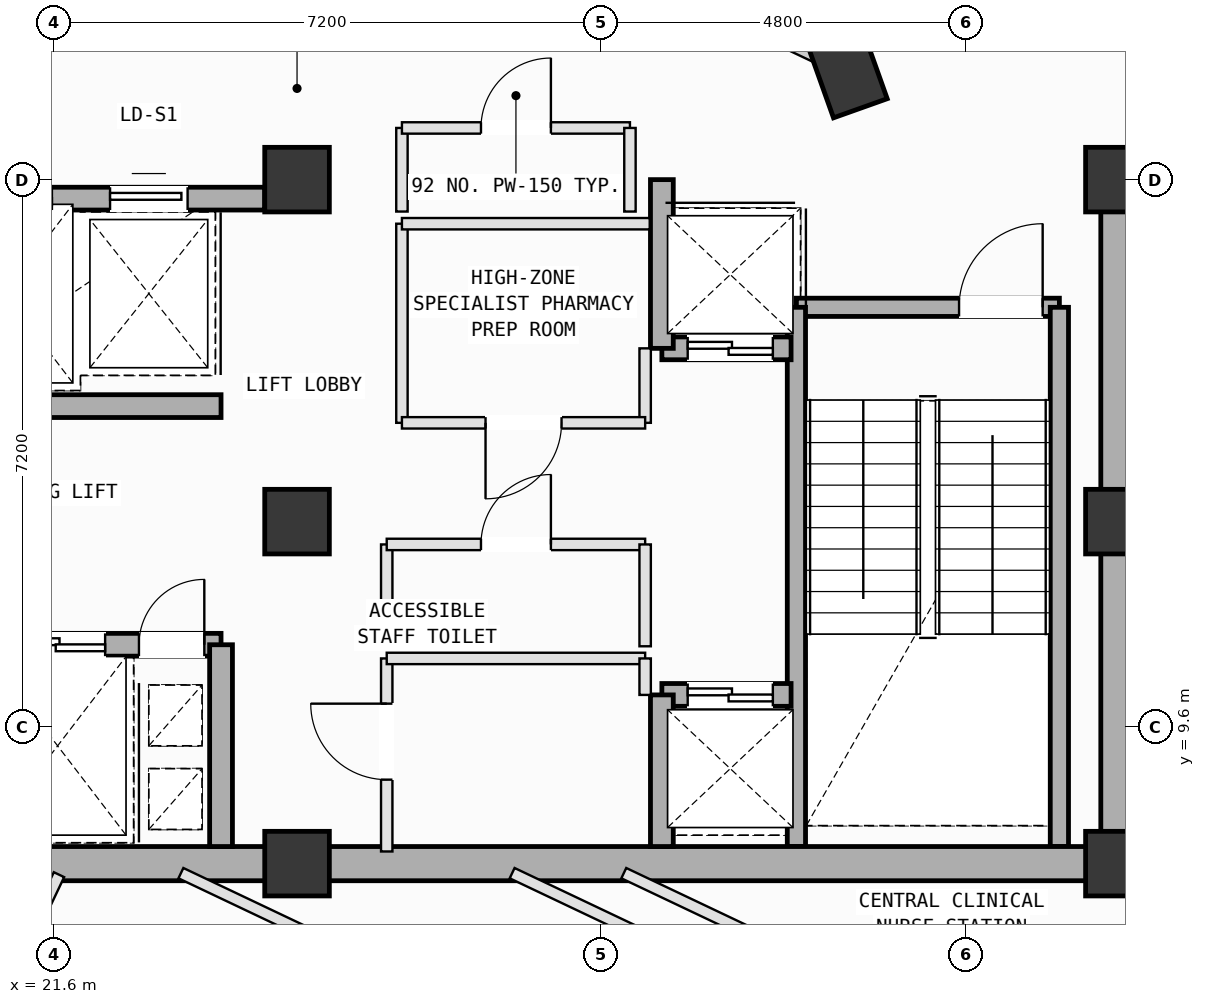
"""IFC4 building model, lengths in metres.
Left out: names, types, materials, properties, quantities, classifications, styles, units other than length and angle.
Written with IfcOpenShell. Run it as: python <this file> out.ifc"""

import sys

from ifc_helpers import new_model, si_unit, direction, frame, frame_2d, origin, origin_2d, place, context, subcontext, project, spatial, rectangle, extrude, element, fill, save


model = new_model("IFC4")
c1 = context("Model", 3, precision=1e-05, world=origin(), true_north=direction((0.0, 1.0)))
c2 = subcontext(c1, "Body", "Model", "MODEL_VIEW")
j1 = project(units=[si_unit("LENGTHUNIT", "METRE"), si_unit("PLANEANGLEUNIT", "RADIAN")], contexts=[c1])
p1 = place(None, origin())
s1 = spatial("IfcSite", under=j1, at=p1, CompositionType="ELEMENT")
p2 = place(p1, origin())
s2 = spatial("IfcBuilding", under=s1, at=p2, CompositionType="ELEMENT")
p3 = place(p2, frame((0.0, 0.0, 300.6)))
s3 = spatial("IfcBuildingStorey", under=s2, at=p3, CompositionType="ELEMENT", Elevation=300.6)
for number, where, z_axis, x_axis in (
    (1, (24.8, 7.8, 0.0), (0.0, 0.0, 1.0), (1.0, 0.0, 0.0)),
    (2, (24.8, 12.3, 0.0), (0.0, 0.0, 1.0), (1.0, 0.0, 0.0)),
    (3, (24.8, 16.8, 0.0), (0.0, 0.0, 1.0), (1.0, 0.0, 0.0)),
    (4, (35.6, 7.8, 0.0), (0.0, 0.0, 1.0), (1.0, 0.0, 0.0)),
    (5, (35.6, 12.3, 0.0), (0.0, 0.0, 1.0), (1.0, 0.0, 0.0)),
    (6, (35.6, 16.8, 0.0), (0.0, 0.0, 1.0), (1.0, 0.0, 0.0)),
):
    element("IfcColumn", number, at=place(p3, frame(where, z_axis=z_axis, x_axis=x_axis)), inside=s3, PredefinedType="COLUMN", context=c2, shape_type="SweptSolid", body=[
        extrude(rectangle(XDim=0.85, YDim=0.85, at=origin_2d()), origin(), (0.0, 0.0, 1.0), 4.0),
    ])
p4 = place(p3, frame((32.01, 18.304, 0.002), z_axis=(0.026991866876, -0.006412095072, 0.999615088001), x_axis=(-0.993728764911, -0.108720172199, 0.026135530332)))
e7 = element("IfcColumn", 7, at=p4, inside=s3, PredefinedType="COLUMN", context=c2, shape_type="SweptSolid", body=[
    extrude(rectangle(XDim=1.2, YDim=0.75, at=origin_2d()), origin(), (0.0, 0.0, 1.0), 3.998),
])
p5 = place(p3, frame((25.415, 21.436, 0.0), z_axis=(0.0, 0.0, 1.0), x_axis=(0.903343787047, -0.428917244236, 0.0)))
e8 = element("IfcWall", 8, at=p5, inside=s3, PredefinedType="SOLIDWALL", context=c2, shape_type="SweptSolid", body=[
    extrude(rectangle(XDim=6.958, YDim=0.28, at=frame_2d((3.479, 0.0))), origin(), (0.0, 0.0, 1.0), 3.165),
])
p6 = place(p3, frame((31.37, 15.12, 0.0), z_axis=(0.0, 0.0, 1.0), x_axis=(1.0, 0.0, 0.0)))
e9 = element("IfcWall", 9, at=p6, inside=s3, PredefinedType="SOLIDWALL", context=c2, shape_type="SweptSolid", body=[
    extrude(rectangle(XDim=3.46, YDim=0.24, at=frame_2d((1.73, 0.0))), origin(), (0.0, 0.0, 1.0), 3.78),
])
p7 = place(p6, frame((2.14, 0.0, 0.0)))
e10 = element("IfcOpeningElement", 10, at=p7, cuts=e9, PredefinedType="OPENING", context=c2, shape_type="SweptSolid", body=[
    extrude(rectangle(XDim=1.1, YDim=2.15, at=frame_2d((0.55, 1.075))), frame((0.0, 0.13, 0.0), z_axis=(0.0, -1.0, 0.0), x_axis=(1.0, 0.0, 0.0)), (0.0, 0.0, 1.0), 0.26),
])
for number, where, z_axis, x_axis in (
    (11, (34.83, 15.12, 0.0), (0.0, 0.0, 1.0), (0.0, -1.0, 0.0)),
    (12, (31.37, 8.025, 0.0), (0.0, 0.0, 1.0), (0.0, 1.0, 0.0)),
):
    element("IfcWall", number, at=place(p3, frame(where, z_axis=z_axis, x_axis=x_axis)), inside=s3, PredefinedType="SOLIDWALL", context=c2, shape_type="SweptSolid", body=[
        extrude(rectangle(XDim=7.095, YDim=0.24, at=frame_2d((3.548, 0.0))), origin(), (0.0, 0.0, 1.0), 3.78),
    ])
for number, where, z_axis, x_axis in (
    (13, (14.0, 7.8, 0.0), (0.0, 0.0, 1.0), (1.0, 0.0, 0.0)),
    (14, (24.8, 7.8, 0.0), (0.0, 0.0, 1.0), (1.0, 0.0, 0.0)),
):
    element("IfcWall", number, at=place(p3, frame(where, z_axis=z_axis, x_axis=x_axis)), inside=s3, PredefinedType="SHEAR", context=c2, shape_type="SweptSolid", body=[
        extrude(rectangle(XDim=10.8, YDim=0.45, at=frame_2d((5.4, 0.0))), origin(), (0.0, 0.0, 1.0), 3.78),
    ])
p8 = place(p3, frame((35.6, 7.8, 0.0), z_axis=(0.0, 0.0, 1.0), x_axis=(0.0, 1.0, 0.0)))
e15 = element("IfcWall", 15, at=p8, inside=s3, PredefinedType="SHEAR", context=c2, shape_type="SweptSolid", body=[
    extrude(rectangle(XDim=9.0, YDim=0.45, at=frame_2d((4.5, 0.0))), origin(), (0.0, 0.0, 1.0), 3.78),
])
p9 = place(p3, frame((19.85, 16.55, 0.0), z_axis=(0.0, 0.0, 1.0), x_axis=(1.0, 0.0, 0.0)))
e16 = element("IfcWall", 16, at=p9, inside=s3, PredefinedType="SOLIDWALL", context=c2, shape_type="SweptSolid", body=[
    extrude(rectangle(XDim=4.525, YDim=0.3, at=frame_2d((2.262, 0.0))), origin(), (0.0, 0.0, 1.0), 3.78),
])
p10 = place(p9, frame((0.475, 0.0, 0.0)))
e17 = element("IfcOpeningElement", 17, at=p10, cuts=e16, PredefinedType="OPENING", context=c2, shape_type="SweptSolid", body=[
    extrude(rectangle(XDim=1.25, YDim=2.18, at=frame_2d((0.625, 1.09))), frame((0.0, 0.16, 0.0), z_axis=(0.0, -1.0, 0.0), x_axis=(1.0, 0.0, 0.0)), (0.0, 0.0, 1.0), 0.32),
])
p11 = place(p9, frame((2.49, 0.0, 0.0)))
e18 = element("IfcOpeningElement", 18, at=p11, cuts=e16, PredefinedType="OPENING", context=c2, shape_type="SweptSolid", body=[
    extrude(rectangle(XDim=1.02, YDim=2.12, at=frame_2d((0.51, 1.06))), frame((0.0, 0.16, 0.0), z_axis=(0.0, -1.0, 0.0), x_axis=(1.0, 0.0, 0.0)), (0.0, 0.0, 1.0), 0.32),
])
p12 = place(p3, frame((18.5, 10.68, 0.0), z_axis=(0.0, 0.0, 1.0), x_axis=(1.0, 0.0, 0.0)))
e19 = element("IfcWall", 19, at=p12, inside=s3, PredefinedType="SOLIDWALL", context=c2, shape_type="SweptSolid", body=[
    extrude(rectangle(XDim=5.3, YDim=0.3, at=frame_2d((2.65, 0.0))), origin(), (0.0, 0.0, 1.0), 3.78),
])
p13 = place(p12, frame((4.22, 0.0, 0.0)))
e20 = element("IfcOpeningElement", 20, at=p13, cuts=e19, PredefinedType="OPENING", context=c2, shape_type="SweptSolid", body=[
    extrude(rectangle(XDim=0.86, YDim=2.06, at=frame_2d((0.43, 1.03))), frame((0.0, 0.16, 0.0), z_axis=(0.0, -1.0, 0.0), x_axis=(1.0, 0.0, 0.0)), (0.0, 0.0, 1.0), 0.32),
])
p14 = place(p12, frame((0.425, 0.0, 0.0)))
e21 = element("IfcOpeningElement", 21, at=p14, cuts=e19, PredefinedType="OPENING", context=c2, shape_type="SweptSolid", body=[
    extrude(rectangle(XDim=1.25, YDim=2.18, at=frame_2d((0.625, 1.09))), frame((0.0, 0.16, 0.0), z_axis=(0.0, -1.0, 0.0), x_axis=(1.0, 0.0, 0.0)), (0.0, 0.0, 1.0), 0.32),
])
p15 = place(p12, frame((2.525, 0.0, 0.0)))
e22 = element("IfcOpeningElement", 22, at=p15, cuts=e19, PredefinedType="OPENING", context=c2, shape_type="SweptSolid", body=[
    extrude(rectangle(XDim=1.25, YDim=2.18, at=frame_2d((0.625, 1.09))), frame((0.0, 0.16, 0.0), z_axis=(0.0, -1.0, 0.0), x_axis=(1.0, 0.0, 0.0)), (0.0, 0.0, 1.0), 0.32),
])
p16 = place(p3, frame((18.5, 13.82, 0.0), z_axis=(0.0, 0.0, 1.0), x_axis=(1.0, 0.0, 0.0)))
e23 = element("IfcWall", 23, at=p16, inside=s3, PredefinedType="SOLIDWALL", context=c2, shape_type="SweptSolid", body=[
    extrude(rectangle(XDim=5.3, YDim=0.3, at=frame_2d((2.65, 0.0))), origin(), (0.0, 0.0, 1.0), 3.78),
])
p17 = place(p16, frame((0.18, 0.0, 0.0)))
e24 = element("IfcOpeningElement", 24, at=p17, cuts=e23, PredefinedType="OPENING", context=c2, shape_type="SweptSolid", body=[
    extrude(rectangle(XDim=1.1, YDim=2.15, at=frame_2d((0.55, 1.075))), frame((0.0, 0.16, 0.0), z_axis=(0.0, -1.0, 0.0), x_axis=(1.0, 0.0, 0.0)), (0.0, 0.0, 1.0), 0.32),
])
p18 = place(p3, frame((23.8, 8.025, 0.0), z_axis=(0.0, 0.0, 1.0), x_axis=(0.0, 1.0, 0.0)))
e25 = element("IfcWall", 25, at=p18, inside=s3, PredefinedType="SOLIDWALL", context=c2, shape_type="SweptSolid", body=[
    extrude(rectangle(XDim=2.655, YDim=0.3, at=frame_2d((1.328, 0.0))), origin(), (0.0, 0.0, 1.0), 3.78),
])
p19 = place(p3, frame((29.6, 10.02, 0.0), z_axis=(0.0, 0.0, 1.0), x_axis=(1.0, 0.0, 0.0)))
e26 = element("IfcWall", 26, at=p19, inside=s3, PredefinedType="SOLIDWALL", context=c2, shape_type="SweptSolid", body=[
    extrude(rectangle(XDim=1.7, YDim=0.3, at=frame_2d((0.85, 0.0))), origin(), (0.0, 0.0, 1.0), 3.78),
])
p20 = place(p19, frame((0.34, 0.0, 0.0)))
e27 = element("IfcOpeningElement", 27, at=p20, cuts=e26, PredefinedType="OPENING", context=c2, shape_type="SweptSolid", body=[
    extrude(rectangle(XDim=1.12, YDim=2.15, at=frame_2d((0.56, 1.075))), frame((0.0, 0.16, 0.0), z_axis=(0.0, -1.0, 0.0), x_axis=(1.0, 0.0, 0.0)), (0.0, 0.0, 1.0), 0.32),
])
p21 = place(p3, frame((29.6, 8.025, 0.0), z_axis=(0.0, 0.0, 1.0), x_axis=(0.0, 1.0, 0.0)))
e28 = element("IfcWall", 28, at=p21, inside=s3, PredefinedType="SOLIDWALL", context=c2, shape_type="SweptSolid", body=[
    extrude(rectangle(XDim=1.995, YDim=0.3, at=frame_2d((0.998, 0.0))), origin(), (0.0, 0.0, 1.0), 3.78),
])
p22 = place(p3, frame((29.6, 14.58, 0.0), z_axis=(0.0, 0.0, 1.0), x_axis=(1.0, 0.0, 0.0)))
e29 = element("IfcWall", 29, at=p22, inside=s3, PredefinedType="SOLIDWALL", context=c2, shape_type="SweptSolid", body=[
    extrude(rectangle(XDim=1.7, YDim=0.3, at=frame_2d((0.85, 0.0))), origin(), (0.0, 0.0, 1.0), 3.78),
])
p23 = place(p22, frame((0.34, 0.0, 0.0)))
e30 = element("IfcOpeningElement", 30, at=p23, cuts=e29, PredefinedType="OPENING", context=c2, shape_type="SweptSolid", body=[
    extrude(rectangle(XDim=1.12, YDim=2.15, at=frame_2d((0.56, 1.075))), frame((0.0, 0.16, 0.0), z_axis=(0.0, -1.0, 0.0), x_axis=(1.0, 0.0, 0.0)), (0.0, 0.0, 1.0), 0.32),
])
p24 = place(p3, frame((29.6, 14.58, 0.0), z_axis=(0.0, 0.0, 1.0), x_axis=(0.0, 1.0, 0.0)))
e31 = element("IfcWall", 31, at=p24, inside=s3, PredefinedType="SOLIDWALL", context=c2, shape_type="SweptSolid", body=[
    extrude(rectangle(XDim=2.22, YDim=0.3, at=frame_2d((1.11, 0.0))), origin(), (0.0, 0.0, 1.0), 3.78),
])
p25 = place(p3, frame((25.98, 7.96, 0.0), z_axis=(0.0, 0.0, 1.0), x_axis=(0.0, 1.0, 0.0)))
e32 = element("IfcWall", 32, at=p25, inside=s3, PredefinedType="PARTITIONING", context=c2, shape_type="SweptSolid", body=[
    extrude(rectangle(XDim=2.54, YDim=0.15, at=frame_2d((1.27, 0.0))), origin(), (0.0, 0.0, 1.0), 3.78),
])
p26 = place(p25, frame((0.945, 0.0, 0.0)))
e33 = element("IfcOpeningElement", 33, at=p26, cuts=e32, PredefinedType="OPENING", context=c2, shape_type="SweptSolid", body=[
    extrude(rectangle(XDim=1.0, YDim=2.12, at=frame_2d((0.5, 1.06))), frame((0.0, 0.085, 0.0), z_axis=(0.0, -1.0, 0.0), x_axis=(1.0, 0.0, 0.0)), (0.0, 0.0, 1.0), 0.17),
])
p27 = place(p3, frame((25.98, 10.5, 0.0), z_axis=(0.0, 0.0, 1.0), x_axis=(1.0, 0.0, 0.0)))
e34 = element("IfcWall", 34, at=p27, inside=s3, PredefinedType="PARTITIONING", context=c2, shape_type="SweptSolid", body=[
    extrude(rectangle(XDim=3.4, YDim=0.15, at=frame_2d((1.7, 0.0))), origin(), (0.0, 0.0, 1.0), 3.78),
])
p28 = place(p3, frame((29.38, 10.5, 0.0), z_axis=(0.0, 0.0, 1.0), x_axis=(0.0, -1.0, 0.0)))
e35 = element("IfcWall", 35, at=p28, inside=s3, PredefinedType="PARTITIONING", context=c2, shape_type="SweptSolid", body=[
    extrude(rectangle(XDim=0.48, YDim=0.15, at=frame_2d((0.24, 0.0))), origin(), (0.0, 0.0, 1.0), 3.78),
])
p29 = place(p3, frame((25.98, 10.66, 0.0), z_axis=(0.0, 0.0, 1.0), x_axis=(0.0, 1.0, 0.0)))
e36 = element("IfcWall", 36, at=p29, inside=s3, PredefinedType="PARTITIONING", context=c2, shape_type="SweptSolid", body=[
    extrude(rectangle(XDim=1.34, YDim=0.15, at=frame_2d((0.67, 0.0))), origin(), (0.0, 0.0, 1.0), 3.78),
])
p30 = place(p3, frame((25.98, 12.0, 0.0), z_axis=(0.0, 0.0, 1.0), x_axis=(1.0, 0.0, 0.0)))
e37 = element("IfcWall", 37, at=p30, inside=s3, PredefinedType="PARTITIONING", context=c2, shape_type="SweptSolid", body=[
    extrude(rectangle(XDim=3.4, YDim=0.15, at=frame_2d((1.7, 0.0))), origin(), (0.0, 0.0, 1.0), 3.78),
])
p31 = place(p30, frame((1.24, 0.0, 0.0)))
e38 = element("IfcOpeningElement", 38, at=p31, cuts=e37, PredefinedType="OPENING", context=c2, shape_type="SweptSolid", body=[
    extrude(rectangle(XDim=0.92, YDim=2.1, at=frame_2d((0.46, 1.05))), frame((0.0, 0.085, 0.0), z_axis=(0.0, -1.0, 0.0), x_axis=(1.0, 0.0, 0.0)), (0.0, 0.0, 1.0), 0.17),
])
p32 = place(p3, frame((29.38, 12.0, 0.0), z_axis=(0.0, 0.0, 1.0), x_axis=(0.0, -1.0, 0.0)))
e39 = element("IfcWall", 39, at=p32, inside=s3, PredefinedType="PARTITIONING", context=c2, shape_type="SweptSolid", body=[
    extrude(rectangle(XDim=1.34, YDim=0.15, at=frame_2d((0.67, 0.0))), origin(), (0.0, 0.0, 1.0), 3.78),
])
p33 = place(p3, frame((26.18, 13.6, 0.0), z_axis=(0.0, 0.0, 1.0), x_axis=(0.0, 1.0, 0.0)))
e40 = element("IfcWall", 40, at=p33, inside=s3, PredefinedType="PARTITIONING", context=c2, shape_type="SweptSolid", body=[
    extrude(rectangle(XDim=2.62, YDim=0.15, at=frame_2d((1.31, 0.0))), origin(), (0.0, 0.0, 1.0), 3.78),
])
p34 = place(p3, frame((26.18, 16.22, 0.0), z_axis=(0.0, 0.0, 1.0), x_axis=(1.0, 0.0, 0.0)))
e41 = element("IfcWall", 41, at=p34, inside=s3, PredefinedType="PARTITIONING", context=c2, shape_type="SweptSolid", body=[
    extrude(rectangle(XDim=3.26, YDim=0.15, at=frame_2d((1.63, 0.0))), origin(), (0.0, 0.0, 1.0), 3.78),
])
p35 = place(p3, frame((29.38, 14.58, 0.0), z_axis=(0.0, 0.0, 1.0), x_axis=(0.0, -1.0, 0.0)))
e42 = element("IfcWall", 42, at=p35, inside=s3, PredefinedType="PARTITIONING", context=c2, shape_type="SweptSolid", body=[
    extrude(rectangle(XDim=0.98, YDim=0.15, at=frame_2d((0.49, 0.0))), origin(), (0.0, 0.0, 1.0), 3.78),
])
p36 = place(p3, frame((29.38, 13.6, 0.0), z_axis=(0.0, 0.0, 1.0), x_axis=(-1.0, 0.0, 0.0)))
e43 = element("IfcWall", 43, at=p36, inside=s3, PredefinedType="PARTITIONING", context=c2, shape_type="SweptSolid", body=[
    extrude(rectangle(XDim=3.2, YDim=0.15, at=frame_2d((1.6, 0.0))), origin(), (0.0, 0.0, 1.0), 3.78),
])
p37 = place(p36, frame((1.1, 0.0, 0.0)))
e44 = element("IfcOpeningElement", 44, at=p37, cuts=e43, PredefinedType="OPENING", context=c2, shape_type="SweptSolid", body=[
    extrude(rectangle(XDim=1.0, YDim=2.12, at=frame_2d((0.5, 1.06))), frame((0.0, 0.085, 0.0), z_axis=(0.0, -1.0, 0.0), x_axis=(1.0, 0.0, 0.0)), (0.0, 0.0, 1.0), 0.17),
])
p38 = place(p3, frame((26.18, 16.38, 0.0), z_axis=(0.0, 0.0, 1.0), x_axis=(0.0, 1.0, 0.0)))
e45 = element("IfcWall", 45, at=p38, inside=s3, PredefinedType="PARTITIONING", context=c2, shape_type="SweptSolid", body=[
    extrude(rectangle(XDim=1.1, YDim=0.15, at=frame_2d((0.55, 0.0))), origin(), (0.0, 0.0, 1.0), 3.78),
])
p39 = place(p3, frame((26.18, 17.48, 0.0), z_axis=(0.0, 0.0, 1.0), x_axis=(1.0, 0.0, 0.0)))
e46 = element("IfcWall", 46, at=p39, inside=s3, PredefinedType="PARTITIONING", context=c2, shape_type="SweptSolid", body=[
    extrude(rectangle(XDim=3.0, YDim=0.15, at=frame_2d((1.5, 0.0))), origin(), (0.0, 0.0, 1.0), 3.78),
])
p40 = place(p39, frame((1.04, 0.0, 0.0)))
e47 = element("IfcOpeningElement", 47, at=p40, cuts=e46, PredefinedType="OPENING", context=c2, shape_type="SweptSolid", body=[
    extrude(rectangle(XDim=0.92, YDim=2.1, at=frame_2d((0.46, 1.05))), frame((0.0, 0.085, 0.0), z_axis=(0.0, -1.0, 0.0), x_axis=(1.0, 0.0, 0.0)), (0.0, 0.0, 1.0), 0.17),
])
p41 = place(p3, frame((29.18, 17.48, 0.0), z_axis=(0.0, 0.0, 1.0), x_axis=(0.0, -1.0, 0.0)))
e48 = element("IfcWall", 48, at=p41, inside=s3, PredefinedType="PARTITIONING", context=c2, shape_type="SweptSolid", body=[
    extrude(rectangle(XDim=1.1, YDim=0.15, at=frame_2d((0.55, 0.0))), origin(), (0.0, 0.0, 1.0), 3.78),
])
p42 = place(p3, frame((18.781, 1.576, 0.0), z_axis=(0.0, 0.0, 1.0), x_axis=(0.428982814931, 0.903312650467, 0.0)))
e49 = element("IfcWall", 49, at=p42, inside=s3, PredefinedType="PARTITIONING", context=c2, shape_type="SweptSolid", body=[
    extrude(rectangle(XDim=6.73, YDim=0.15, at=frame_2d((3.365, 0.0))), origin(), (0.0, 0.0, 1.0), 3.78),
])
p43 = place(p42, frame((2.849, 0.0, 0.0)))
e50 = element("IfcOpeningElement", 50, at=p43, cuts=e49, PredefinedType="OPENING", context=c2, shape_type="SweptSolid", body=[
    extrude(rectangle(XDim=0.86, YDim=2.06, at=frame_2d((0.43, 1.03))), frame((0.0, 0.085, 0.0), z_axis=(0.0, -1.0, 0.0), x_axis=(1.0, 0.0, 0.0)), (0.0, 0.0, 1.0), 0.17),
])
p44 = place(p3, frame((23.272, 7.675, 0.0), z_axis=(0.0, 0.0, 1.0), x_axis=(0.903279475918, -0.429052663882, 0.0)))
e51 = element("IfcWall", 51, at=p44, inside=s3, PredefinedType="PARTITIONING", context=c2, shape_type="SweptSolid", body=[
    extrude(rectangle(XDim=4.799, YDim=0.15, at=frame_2d((2.399, 0.0))), origin(), (0.0, 0.0, 1.0), 3.78),
])
p45 = place(p3, frame((35.441, 4.664, 0.0), z_axis=(0.0, 0.0, 1.0), x_axis=(-0.903352966439, 0.42889791096, 0.0)))
e52 = element("IfcWall", 52, at=p45, inside=s3, PredefinedType="PARTITIONING", context=c2, shape_type="SweptSolid", body=[
    extrude(rectangle(XDim=7.02, YDim=0.15, at=frame_2d((3.51, 0.0))), origin(), (0.0, 0.0, 1.0), 3.78),
])
p46 = place(p3, frame((35.6, 7.5, 0.0), z_axis=(0.0, 0.0, 1.0), x_axis=(1.0, 0.0, 0.0)))
e53 = element("IfcWall", 53, at=p46, inside=s3, PredefinedType="PARTITIONING", context=c2, shape_type="SweptSolid", body=[
    extrude(rectangle(XDim=0.55, YDim=0.15, at=frame_2d((0.275, 0.0))), origin(), (0.0, 0.0, 1.0), 3.165),
])
p47 = place(p3, frame((37.15, 8.263, 0.0), z_axis=(0.0, 0.0, 1.0), x_axis=(-0.428958064464, -0.903324404038, 0.0)))
e54 = element("IfcWall", 54, at=p47, inside=s3, PredefinedType="PARTITIONING", context=c2, shape_type="SweptSolid", body=[
    extrude(rectangle(XDim=3.984, YDim=0.15, at=frame_2d((1.992, 0.0))), origin(), (0.0, 0.0, 1.0), 3.78),
])
p48 = place(p47, frame((2.074, 0.0, 0.0)))
e55 = element("IfcOpeningElement", 55, at=p48, cuts=e54, PredefinedType="OPENING", context=c2, shape_type="SweptSolid", body=[
    extrude(rectangle(XDim=1.0, YDim=2.12, at=frame_2d((0.5, 1.06))), frame((0.0, 0.085, 0.0), z_axis=(0.0, -1.0, 0.0), x_axis=(1.0, 0.0, 0.0)), (0.0, 0.0, 1.0), 0.17),
])
p49 = place(p3, frame((27.63, 7.675, 0.0), z_axis=(0.0, 0.0, 1.0), x_axis=(0.903354516737, -0.428894645678, 0.0)))
e56 = element("IfcWall", 56, at=p49, inside=s3, PredefinedType="PARTITIONING", context=c2, shape_type="SweptSolid", body=[
    extrude(rectangle(XDim=6.633, YDim=0.15, at=frame_2d((3.317, 0.0))), origin(), (0.0, 0.0, 1.0), 3.78),
])
p50 = place(p7, origin())
e57 = element("IfcDoor", 57, at=p50, inside=s3, OperationType="SINGLE_SWING_RIGHT", PredefinedType="DOOR", context=c2, shape_type="SweptSolid", body=[
    extrude(rectangle(XDim=1.1, YDim=2.15, at=frame_2d((0.55, 1.075))), frame((0.0, 0.025, 0.0), z_axis=(0.0, -1.0, 0.0), x_axis=(1.0, 0.0, 0.0)), (0.0, 0.0, 1.0), 0.05),
])
fill(e10, e57)
p51 = place(p13, origin())
e58 = element("IfcDoor", 58, at=p51, inside=s3, OperationType="SINGLE_SWING_RIGHT", PredefinedType="DOOR", context=c2, shape_type="SweptSolid", body=[
    extrude(rectangle(XDim=0.86, YDim=2.06, at=frame_2d((0.43, 1.03))), frame((0.0, 0.025, 0.0), z_axis=(0.0, -1.0, 0.0), x_axis=(1.0, 0.0, 0.0)), (0.0, 0.0, 1.0), 0.05),
])
fill(e20, e58)
p52 = place(p15, origin())
e59 = element("IfcDoor", 59, at=p52, inside=s3, OperationType="DOUBLE_DOOR_SLIDING", PredefinedType="DOOR", context=c2, shape_type="SweptSolid", body=[
    extrude(rectangle(XDim=1.25, YDim=2.18, at=frame_2d((0.625, 1.09))), frame((0.0, 0.025, 0.0), z_axis=(0.0, -1.0, 0.0), x_axis=(1.0, 0.0, 0.0)), (0.0, 0.0, 1.0), 0.05),
])
fill(e22, e59)
p53 = place(p20, origin())
e60 = element("IfcDoor", 60, at=p53, inside=s3, OperationType="DOUBLE_DOOR_SLIDING", PredefinedType="DOOR", context=c2, shape_type="SweptSolid", body=[
    extrude(rectangle(XDim=1.12, YDim=2.15, at=frame_2d((0.56, 1.075))), frame((0.0, 0.025, 0.0), z_axis=(0.0, -1.0, 0.0), x_axis=(1.0, 0.0, 0.0)), (0.0, 0.0, 1.0), 0.05),
])
fill(e27, e60)
p54 = place(p23, origin())
e61 = element("IfcDoor", 61, at=p54, inside=s3, OperationType="DOUBLE_DOOR_SLIDING", PredefinedType="DOOR", context=c2, shape_type="SweptSolid", body=[
    extrude(rectangle(XDim=1.12, YDim=2.15, at=frame_2d((0.56, 1.075))), frame((0.0, 0.025, 0.0), z_axis=(0.0, -1.0, 0.0), x_axis=(1.0, 0.0, 0.0)), (0.0, 0.0, 1.0), 0.05),
])
fill(e30, e61)
p55 = place(p11, origin())
e62 = element("IfcDoor", 62, at=p55, inside=s3, OperationType="SLIDING_TO_LEFT", PredefinedType="DOOR", context=c2, shape_type="SweptSolid", body=[
    extrude(rectangle(XDim=1.02, YDim=2.12, at=frame_2d((0.51, 1.06))), frame((0.0, 0.025, 0.0), z_axis=(0.0, -1.0, 0.0), x_axis=(1.0, 0.0, 0.0)), (0.0, 0.0, 1.0), 0.05),
])
fill(e18, e62)
p56 = place(p26, origin())
e63 = element("IfcDoor", 63, at=p56, inside=s3, OperationType="SINGLE_SWING_RIGHT", PredefinedType="DOOR", context=c2, shape_type="SweptSolid", body=[
    extrude(rectangle(XDim=1.0, YDim=2.12, at=frame_2d((0.5, 1.06))), frame((0.0, 0.025, 0.0), z_axis=(0.0, -1.0, 0.0), x_axis=(1.0, 0.0, 0.0)), (0.0, 0.0, 1.0), 0.05),
])
fill(e33, e63)
p57 = place(p31, origin())
e64 = element("IfcDoor", 64, at=p57, inside=s3, OperationType="SINGLE_SWING_RIGHT", PredefinedType="DOOR", context=c2, shape_type="SweptSolid", body=[
    extrude(rectangle(XDim=0.92, YDim=2.1, at=frame_2d((0.46, 1.05))), frame((0.0, 0.025, 0.0), z_axis=(0.0, -1.0, 0.0), x_axis=(1.0, 0.0, 0.0)), (0.0, 0.0, 1.0), 0.05),
])
fill(e38, e64)
p58 = place(p37, origin())
e65 = element("IfcDoor", 65, at=p58, inside=s3, OperationType="SINGLE_SWING_RIGHT", PredefinedType="DOOR", context=c2, shape_type="SweptSolid", body=[
    extrude(rectangle(XDim=1.0, YDim=2.12, at=frame_2d((0.5, 1.06))), frame((0.0, 0.025, 0.0), z_axis=(0.0, -1.0, 0.0), x_axis=(1.0, 0.0, 0.0)), (0.0, 0.0, 1.0), 0.05),
])
fill(e44, e65)
p59 = place(p40, origin())
e66 = element("IfcDoor", 66, at=p59, inside=s3, OperationType="SINGLE_SWING_RIGHT", PredefinedType="DOOR", context=c2, shape_type="SweptSolid", body=[
    extrude(rectangle(XDim=0.92, YDim=2.1, at=frame_2d((0.46, 1.05))), frame((0.0, 0.025, 0.0), z_axis=(0.0, -1.0, 0.0), x_axis=(1.0, 0.0, 0.0)), (0.0, 0.0, 1.0), 0.05),
])
fill(e47, e66)
save(model, sys.argv[1])
